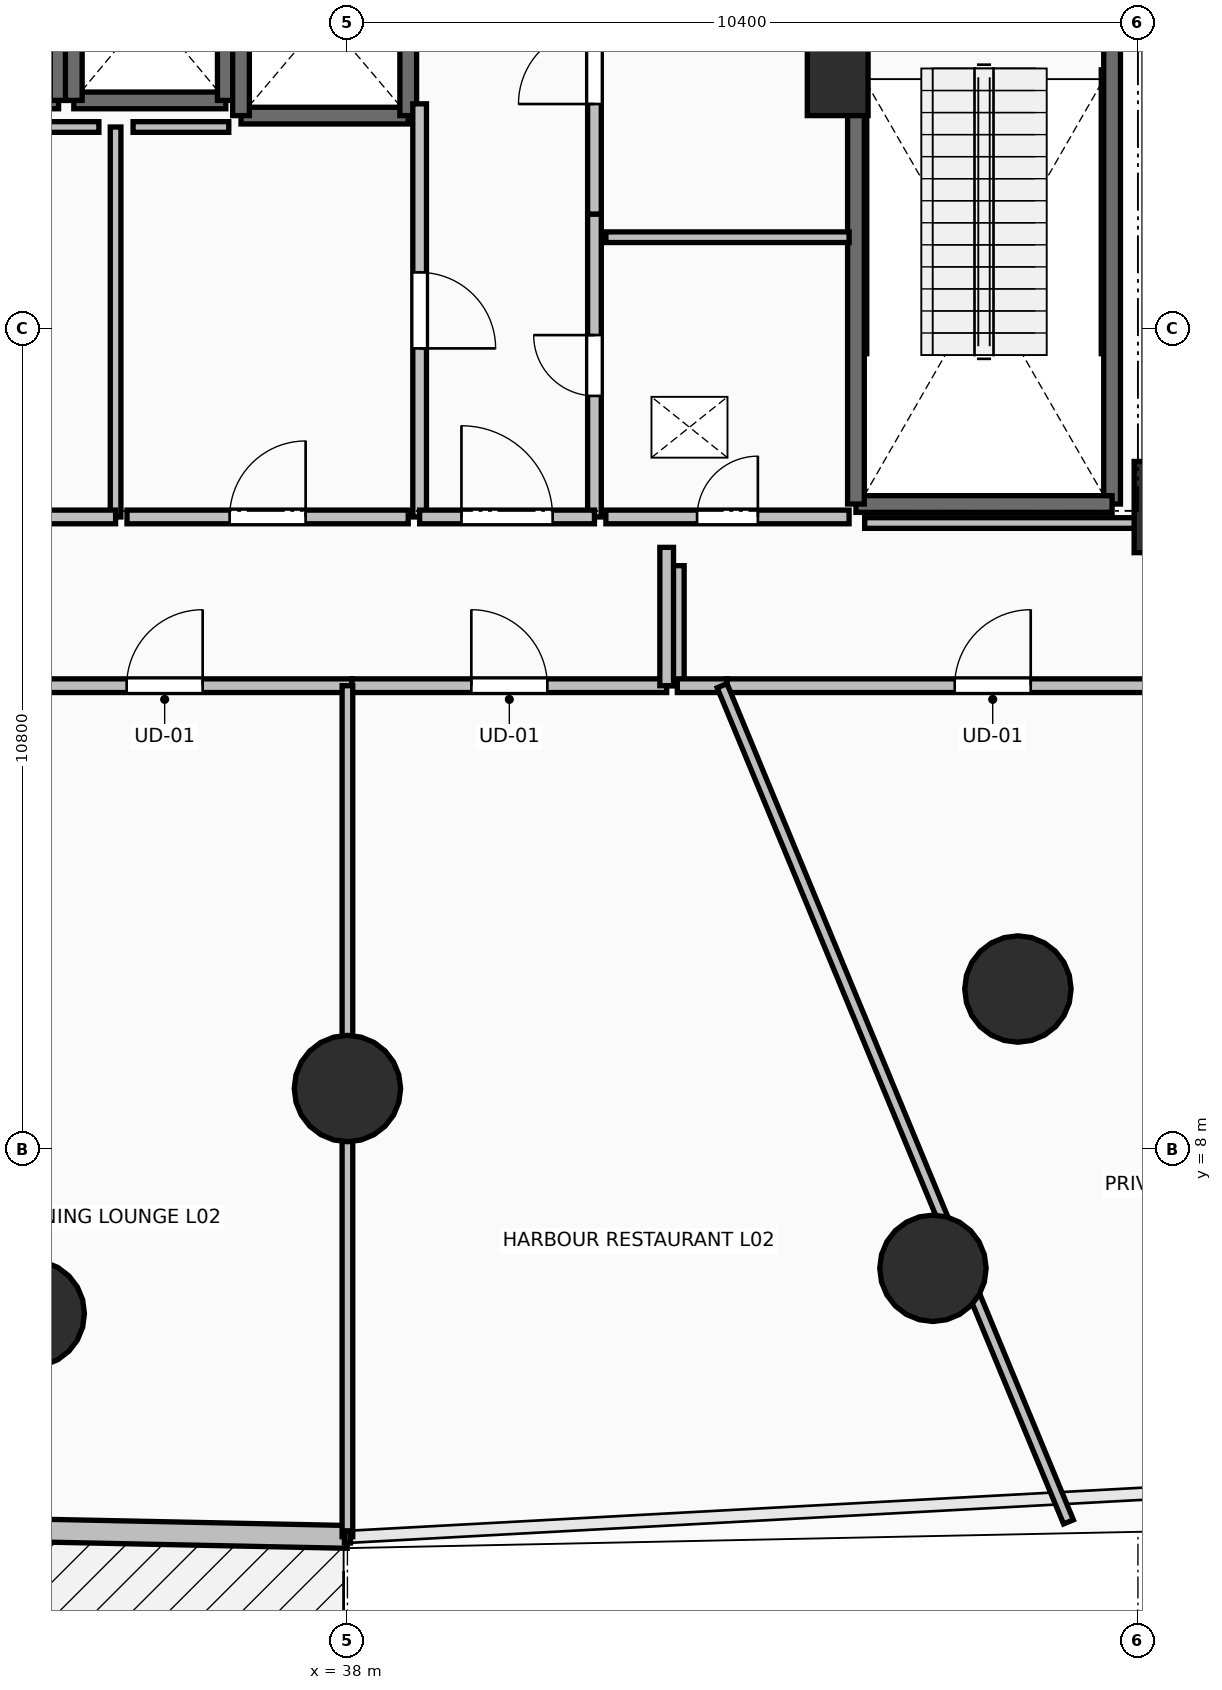
"""IFC4 building model, lengths in metres.
Left out: names, types, materials, properties, quantities, classifications, styles, units other than length and angle.
Written with IfcOpenShell. Run it as: python <this file> out.ifc"""

import sys

from ifc_helpers import new_model, si_unit, direction, frame, frame_2d, origin, origin_2d, place, context, subcontext, project, spatial, rectangle, circle, extrude, element, fill, save


model = new_model("IFC4")
c1 = context("Model", 3, precision=1e-05, world=origin(), true_north=direction((0.0, 1.0)))
c2 = subcontext(c1, "Body", "Model", "MODEL_VIEW")
j1 = project(units=[si_unit("LENGTHUNIT", "METRE"), si_unit("PLANEANGLEUNIT", "RADIAN")], contexts=[c1])
p1 = place(None, origin())
s1 = spatial("IfcSite", under=j1, at=p1, CompositionType="ELEMENT")
p2 = place(p1, origin())
s2 = spatial("IfcBuilding", under=s1, at=p2, CompositionType="ELEMENT")
p3 = place(p2, frame((0.0, 0.0, 9.6)))
s3 = spatial("IfcBuildingStorey", under=s2, at=p3, CompositionType="ELEMENT", Elevation=9.6)
for number, where, z_axis, x_axis in (
    (1, (38.0, 8.8, 0.0), (0.0, 0.0, 1.0), (0.0, -1.0, 0.0)),
    (2, (46.821, 10.109, 0.0), (0.0, 0.0, 1.0), (0.383, -0.924, 0.0)),
    (3, (33.84, 5.84, 0.0), (0.0, 0.0, 1.0), (0.0, -1.0, 0.0)),
    (4, (45.703, 6.435, 0.0), (0.0, 0.0, 1.0), (0.383, -0.924, 0.0)),
):
    element("IfcColumn", number, at=place(p3, frame(where, z_axis=z_axis, x_axis=x_axis)), inside=s3, PredefinedType="COLUMN", context=c2, shape_type="SweptSolid", body=[
        extrude(circle(Radius=0.7, at=origin_2d()), origin(), (0.0, 0.0, 1.0), 4.8),
    ])
for number, where, z_axis, x_axis in (
    (5, (48.75, 16.45, 0.0), (0.0, 0.0, 1.0), (1.0, 0.0, 0.0)),
    (6, (44.45, 22.2, 0.0), (0.0, 0.0, 1.0), (1.0, 0.0, 0.0)),
):
    element("IfcColumn", number, at=place(p3, frame(where, z_axis=z_axis, x_axis=x_axis)), inside=s3, PredefinedType="PILASTER", context=c2, shape_type="SweptSolid", body=[
        extrude(rectangle(XDim=0.8, YDim=1.2, at=origin_2d()), origin(), (0.0, 0.0, 1.0), 4.8),
    ])
p4 = place(p3, frame((25.732, 3.154, 0.0), z_axis=(0.0, 0.0, 1.0), x_axis=(0.99978877583, -0.020552462746, 0.0)))
e7 = element("IfcWall", 7, at=p4, inside=s3, PredefinedType="STANDARD", context=c2, shape_type="SweptSolid", body=[
    extrude(rectangle(XDim=12.271, YDim=0.3, at=frame_2d((6.135, 0.0))), origin(), (0.0, 0.0, 1.0), 4.48),
])
p5 = place(p4, frame((5.335, 0.0, 0.0)))
e8 = element("IfcOpeningElement", 8, at=p5, cuts=e7, PredefinedType="OPENING", context=c2, shape_type="SweptSolid", body=[
    extrude(rectangle(XDim=1.6, YDim=2.3, at=frame_2d((0.8, 1.15))), frame((0.0, 0.165, 0.0), z_axis=(0.0, -1.0, 0.0), x_axis=(1.0, 0.0, 0.0)), (0.0, 0.0, 1.0), 0.33),
])
p6 = place(p3, frame((48.06, 23.91, 0.0), z_axis=(0.0, 0.0, 1.0), x_axis=(0.0, -1.0, 0.0)))
e9 = element("IfcWall", 9, at=p6, inside=s3, PredefinedType="SOLIDWALL", context=c2, shape_type="SweptSolid", body=[
    extrude(rectangle(XDim=7.42, YDim=0.22, at=frame_2d((3.71, 0.0))), origin(), (0.0, 0.0, 1.0), 4.48),
])
p7 = place(p3, frame((48.06, 16.49, 0.0), z_axis=(0.0, 0.0, 1.0), x_axis=(-1.0, 0.0, 0.0)))
e10 = element("IfcWall", 10, at=p7, inside=s3, PredefinedType="SOLIDWALL", context=c2, shape_type="SweptSolid", body=[
    extrude(rectangle(XDim=3.37, YDim=0.22, at=frame_2d((1.685, 0.0))), origin(), (0.0, 0.0, 1.0), 4.48),
])
p8 = place(p3, frame((44.69, 16.49, 0.0), z_axis=(0.0, 0.0, 1.0), x_axis=(0.0, 1.0, 0.0)))
e11 = element("IfcWall", 11, at=p8, inside=s3, PredefinedType="SOLIDWALL", context=c2, shape_type="SweptSolid", body=[
    extrude(rectangle(XDim=7.42, YDim=0.22, at=frame_2d((3.71, 0.0))), origin(), (0.0, 0.0, 1.0), 4.48),
])
p9 = place(p3, frame((32.2, 21.8, 0.0), z_axis=(0.0, 0.0, 1.0), x_axis=(1.0, 0.0, 0.0)))
e12 = element("IfcWall", 12, at=p9, inside=s3, PredefinedType="SOLIDWALL", context=c2, shape_type="SweptSolid", body=[
    extrude(rectangle(XDim=2.0, YDim=0.22, at=frame_2d((1.0, 0.0))), origin(), (0.0, 0.0, 1.0), 4.48),
])
p10 = place(p3, frame((34.2, 21.8, 0.0), z_axis=(0.0, 0.0, 1.0), x_axis=(0.0, 1.0, 0.0)))
e13 = element("IfcWall", 13, at=p10, inside=s3, PredefinedType="SOLIDWALL", context=c2, shape_type="SweptSolid", body=[
    extrude(rectangle(XDim=2.4, YDim=0.22, at=frame_2d((1.2, 0.0))), origin(), (0.0, 0.0, 1.0), 4.48),
])
p11 = place(p3, frame((34.4, 21.8, 0.0), z_axis=(0.0, 0.0, 1.0), x_axis=(1.0, 0.0, 0.0)))
e14 = element("IfcWall", 14, at=p11, inside=s3, PredefinedType="SOLIDWALL", context=c2, shape_type="SweptSolid", body=[
    extrude(rectangle(XDim=2.0, YDim=0.22, at=frame_2d((1.0, 0.0))), origin(), (0.0, 0.0, 1.0), 4.48),
])
for number, where, z_axis, x_axis in (
    (15, (36.4, 21.8, 0.0), (0.0, 0.0, 1.0), (0.0, 1.0, 0.0)),
    (16, (34.4, 24.2, 0.0), (0.0, 0.0, 1.0), (0.0, -1.0, 0.0)),
):
    element("IfcWall", number, at=place(p3, frame(where, z_axis=z_axis, x_axis=x_axis)), inside=s3, PredefinedType="SOLIDWALL", context=c2, shape_type="SweptSolid", body=[
        extrude(rectangle(XDim=2.4, YDim=0.22, at=frame_2d((1.2, 0.0))), origin(), (0.0, 0.0, 1.0), 4.48),
    ])
p12 = place(p3, frame((36.6, 21.6, 0.0), z_axis=(0.0, 0.0, 1.0), x_axis=(1.0, 0.0, 0.0)))
e17 = element("IfcWall", 17, at=p12, inside=s3, PredefinedType="SOLIDWALL", context=c2, shape_type="SweptSolid", body=[
    extrude(rectangle(XDim=2.2, YDim=0.22, at=frame_2d((1.1, 0.0))), origin(), (0.0, 0.0, 1.0), 4.48),
])
for number, where, z_axis, x_axis in (
    (18, (38.8, 21.6, 0.0), (0.0, 0.0, 1.0), (0.0, 1.0, 0.0)),
    (19, (36.6, 24.2, 0.0), (0.0, 0.0, 1.0), (0.0, -1.0, 0.0)),
):
    element("IfcWall", number, at=place(p3, frame(where, z_axis=z_axis, x_axis=x_axis)), inside=s3, PredefinedType="SOLIDWALL", context=c2, shape_type="SweptSolid", body=[
        extrude(rectangle(XDim=2.6, YDim=0.22, at=frame_2d((1.3, 0.0))), origin(), (0.0, 0.0, 1.0), 4.48),
    ])
p13 = place(p3, frame((41.25, 16.32, 0.0), z_axis=(0.0, 0.0, 1.0), x_axis=(0.0, 1.0, 0.0)))
e20 = element("IfcWall", 20, at=p13, inside=s3, PredefinedType="PARTITIONING", context=c2, shape_type="SweptSolid", body=[
    extrude(rectangle(XDim=3.985, YDim=0.18, at=frame_2d((1.992, 0.0))), origin(), (0.0, 0.0, 1.0), 4.48),
])
p14 = place(p13, frame((1.593, 0.0, 0.0)))
e21 = element("IfcOpeningElement", 21, at=p14, cuts=e20, PredefinedType="OPENING", context=c2, shape_type="SweptSolid", body=[
    extrude(rectangle(XDim=0.8, YDim=2.05, at=frame_2d((0.4, 1.025))), frame((0.0, 0.105, 0.0), z_axis=(0.0, -1.0, 0.0), x_axis=(1.0, 0.0, 0.0)), (0.0, 0.0, 1.0), 0.21),
])
p15 = place(p3, frame((41.25, 20.305, 0.0), z_axis=(0.0, 0.0, 1.0), x_axis=(0.0, 1.0, 0.0)))
e22 = element("IfcWall", 22, at=p15, inside=s3, PredefinedType="PARTITIONING", context=c2, shape_type="SweptSolid", body=[
    extrude(rectangle(XDim=3.895, YDim=0.18, at=frame_2d((1.948, 0.0))), origin(), (0.0, 0.0, 1.0), 4.48),
])
p16 = place(p15, frame((1.448, 0.0, 0.0)))
e23 = element("IfcOpeningElement", 23, at=p16, cuts=e22, PredefinedType="OPENING", context=c2, shape_type="SweptSolid", body=[
    extrude(rectangle(XDim=1.0, YDim=2.15, at=frame_2d((0.5, 1.075))), frame((0.0, 0.105, 0.0), z_axis=(0.0, -1.0, 0.0), x_axis=(1.0, 0.0, 0.0)), (0.0, 0.0, 1.0), 0.21),
])
p17 = place(p3, frame((38.95, 21.755, 0.0), z_axis=(0.0, 0.0, 1.0), x_axis=(0.0, -1.0, 0.0)))
e24 = element("IfcWall", 24, at=p17, inside=s3, PredefinedType="PARTITIONING", context=c2, shape_type="SweptSolid", body=[
    extrude(rectangle(XDim=5.435, YDim=0.18, at=frame_2d((2.717, 0.0))), origin(), (0.0, 0.0, 1.0), 4.48),
])
p18 = place(p17, frame((2.218, 0.0, 0.0)))
e25 = element("IfcOpeningElement", 25, at=p18, cuts=e24, PredefinedType="OPENING", context=c2, shape_type="SweptSolid", body=[
    extrude(rectangle(XDim=1.0, YDim=2.15, at=frame_2d((0.5, 1.075))), frame((0.0, 0.105, 0.0), z_axis=(0.0, -1.0, 0.0), x_axis=(1.0, 0.0, 0.0)), (0.0, 0.0, 1.0), 0.21),
])
p19 = place(p3, frame((38.95, 16.32, 0.0), z_axis=(0.0, 0.0, 1.0), x_axis=(1.0, 0.0, 0.0)))
e26 = element("IfcWall", 26, at=p19, inside=s3, PredefinedType="PARTITIONING", context=c2, shape_type="SweptSolid", body=[
    extrude(rectangle(XDim=2.3, YDim=0.18, at=frame_2d((1.15, 0.0))), origin(), (0.0, 0.0, 1.0), 4.48),
])
p20 = place(p19, frame((0.55, 0.0, 0.0)))
e27 = element("IfcOpeningElement", 27, at=p20, cuts=e26, PredefinedType="OPENING", context=c2, shape_type="SweptSolid", body=[
    extrude(rectangle(XDim=1.2, YDim=2.15, at=frame_2d((0.6, 1.075))), frame((0.0, 0.105, 0.0), z_axis=(0.0, -1.0, 0.0), x_axis=(1.0, 0.0, 0.0)), (0.0, 0.0, 1.0), 0.21),
])
p21 = place(p3, frame((44.6, 20.0, 0.0), z_axis=(0.0, 0.0, 1.0), x_axis=(-1.0, 0.0, 0.0)))
e28 = element("IfcWall", 28, at=p21, inside=s3, PredefinedType="PARTITIONING", context=c2, shape_type="SweptSolid", body=[
    extrude(rectangle(XDim=3.2, YDim=0.14, at=frame_2d((1.6, 0.0))), origin(), (0.0, 0.0, 1.0), 4.48),
])
p22 = place(p3, frame((41.4, 16.32, 0.0), z_axis=(0.0, 0.0, 1.0), x_axis=(1.0, 0.0, 0.0)))
e29 = element("IfcWall", 29, at=p22, inside=s3, PredefinedType="PARTITIONING", context=c2, shape_type="SweptSolid", body=[
    extrude(rectangle(XDim=3.2, YDim=0.18, at=frame_2d((1.6, 0.0))), origin(), (0.0, 0.0, 1.0), 4.48),
])
p23 = place(p22, frame((1.2, 0.0, 0.0)))
e30 = element("IfcOpeningElement", 30, at=p23, cuts=e29, PredefinedType="OPENING", context=c2, shape_type="SweptSolid", body=[
    extrude(rectangle(XDim=0.8, YDim=2.05, at=frame_2d((0.4, 1.025))), frame((0.0, 0.105, 0.0), z_axis=(0.0, -1.0, 0.0), x_axis=(1.0, 0.0, 0.0)), (0.0, 0.0, 1.0), 0.21),
])
p24 = place(p3, frame((34.95, 16.32, 0.0), z_axis=(0.0, 0.0, 1.0), x_axis=(0.0, 1.0, 0.0)))
e31 = element("IfcWall", 31, at=p24, inside=s3, PredefinedType="PARTITIONING", context=c2, shape_type="SweptSolid", body=[
    extrude(rectangle(XDim=5.13, YDim=0.14, at=frame_2d((2.565, 0.0))), origin(), (0.0, 0.0, 1.0), 4.48),
])
p25 = place(p3, frame((31.4, 16.32, 0.0), z_axis=(0.0, 0.0, 1.0), x_axis=(1.0, 0.0, 0.0)))
e32 = element("IfcWall", 32, at=p25, inside=s3, PredefinedType="PARTITIONING", context=c2, shape_type="SweptSolid", body=[
    extrude(rectangle(XDim=3.55, YDim=0.18, at=frame_2d((1.775, 0.0))), origin(), (0.0, 0.0, 1.0), 4.48),
])
p26 = place(p25, frame((1.35, 0.0, 0.0)))
e33 = element("IfcOpeningElement", 33, at=p26, cuts=e32, PredefinedType="OPENING", context=c2, shape_type="SweptSolid", body=[
    extrude(rectangle(XDim=0.85, YDim=2.1, at=frame_2d((0.425, 1.05))), frame((0.0, 0.105, 0.0), z_axis=(0.0, -1.0, 0.0), x_axis=(1.0, 0.0, 0.0)), (0.0, 0.0, 1.0), 0.21),
])
p27 = place(p3, frame((35.1, 16.32, 0.0), z_axis=(0.0, 0.0, 1.0), x_axis=(1.0, 0.0, 0.0)))
e34 = element("IfcWall", 34, at=p27, inside=s3, PredefinedType="PARTITIONING", context=c2, shape_type="SweptSolid", body=[
    extrude(rectangle(XDim=3.7, YDim=0.18, at=frame_2d((1.85, 0.0))), origin(), (0.0, 0.0, 1.0), 4.48),
])
p28 = place(p27, frame((1.35, 0.0, 0.0)))
e35 = element("IfcOpeningElement", 35, at=p28, cuts=e34, PredefinedType="OPENING", context=c2, shape_type="SweptSolid", body=[
    extrude(rectangle(XDim=1.0, YDim=2.15, at=frame_2d((0.5, 1.075))), frame((0.0, 0.105, 0.0), z_axis=(0.0, -1.0, 0.0), x_axis=(1.0, 0.0, 0.0)), (0.0, 0.0, 1.0), 0.21),
])
p29 = place(p3, frame((33.131, 14.1, 0.0), z_axis=(0.0, 0.0, 1.0), x_axis=(1.0, 0.0, 0.0)))
e36 = element("IfcWall", 36, at=p29, inside=s3, PredefinedType="PARTITIONING", context=c2, shape_type="SweptSolid", body=[
    extrude(rectangle(XDim=4.929, YDim=0.18, at=frame_2d((2.464, 0.0))), origin(), (0.0, 0.0, 1.0), 4.48),
])
p30 = place(p29, frame((1.965, 0.0, 0.0)))
e37 = element("IfcOpeningElement", 37, at=p30, cuts=e36, PredefinedType="OPENING", context=c2, shape_type="SweptSolid", body=[
    extrude(rectangle(XDim=1.0, YDim=2.15, at=frame_2d((0.5, 1.075))), frame((0.0, 0.105, 0.0), z_axis=(0.0, -1.0, 0.0), x_axis=(1.0, 0.0, 0.0)), (0.0, 0.0, 1.0), 0.21),
])
p31 = place(p3, frame((42.34, 15.679, 0.0), z_axis=(0.0, 0.0, 1.0), x_axis=(0.0, -1.0, 0.0)))
e38 = element("IfcWall", 38, at=p31, inside=s3, PredefinedType="PARTITIONING", context=c2, shape_type="SweptSolid", body=[
    extrude(rectangle(XDim=1.579, YDim=0.18, at=frame_2d((0.79, 0.0))), origin(), (0.0, 0.0, 1.0), 4.48),
])
p32 = place(p3, frame((42.34, 14.1, 0.0), z_axis=(0.0, 0.0, 1.0), x_axis=(1.0, 0.0, 0.0)))
e39 = element("IfcWall", 39, at=p32, inside=s3, PredefinedType="PARTITIONING", context=c2, shape_type="SweptSolid", body=[
    extrude(rectangle(XDim=0.654, YDim=0.18, at=frame_2d((0.327, 0.0))), origin(), (0.0, 0.0, 1.0), 4.48),
])
p33 = place(p3, frame((38.06, 14.1, 0.0), z_axis=(0.0, 0.0, 1.0), x_axis=(1.0, 0.0, 0.0)))
e40 = element("IfcWall", 40, at=p33, inside=s3, PredefinedType="PARTITIONING", context=c2, shape_type="SweptSolid", body=[
    extrude(rectangle(XDim=4.14, YDim=0.18, at=frame_2d((2.07, 0.0))), origin(), (0.0, 0.0, 1.0), 4.48),
])
p34 = place(p33, frame((1.57, 0.0, 0.0)))
e41 = element("IfcOpeningElement", 41, at=p34, cuts=e40, PredefinedType="OPENING", context=c2, shape_type="SweptSolid", body=[
    extrude(rectangle(XDim=1.0, YDim=2.15, at=frame_2d((0.5, 1.075))), frame((0.0, 0.105, 0.0), z_axis=(0.0, -1.0, 0.0), x_axis=(1.0, 0.0, 0.0)), (0.0, 0.0, 1.0), 0.21),
])
p35 = place(p3, frame((42.2, 14.1, 0.0), z_axis=(0.0, 0.0, 1.0), x_axis=(0.0, 1.0, 0.0)))
e42 = element("IfcWall", 42, at=p35, inside=s3, PredefinedType="PARTITIONING", context=c2, shape_type="SweptSolid", body=[
    extrude(rectangle(XDim=1.82, YDim=0.18, at=frame_2d((0.91, 0.0))), origin(), (0.0, 0.0, 1.0), 4.48),
])
p36 = place(p3, frame((42.994, 14.1, 0.0), z_axis=(0.0, 0.0, 1.0), x_axis=(1.0, 0.0, 0.0)))
e43 = element("IfcWall", 43, at=p36, inside=s3, PredefinedType="PARTITIONING", context=c2, shape_type="SweptSolid", body=[
    extrude(rectangle(XDim=6.991, YDim=0.18, at=frame_2d((3.496, 0.0))), origin(), (0.0, 0.0, 1.0), 3.672),
])
p37 = place(p36, frame((2.996, 0.0, 0.0)))
e44 = element("IfcOpeningElement", 44, at=p37, cuts=e43, PredefinedType="OPENING", context=c2, shape_type="SweptSolid", body=[
    extrude(rectangle(XDim=1.0, YDim=2.15, at=frame_2d((0.5, 1.075))), frame((0.0, 0.105, 0.0), z_axis=(0.0, -1.0, 0.0), x_axis=(1.0, 0.0, 0.0)), (0.0, 0.0, 1.0), 0.21),
])
p38 = place(p3, frame((38.0, 2.904, 0.0), z_axis=(0.0, 0.0, 1.0), x_axis=(0.0, 1.0, 0.0)))
e45 = element("IfcWall", 45, at=p38, inside=s3, PredefinedType="PARTITIONING", context=c2, shape_type="SweptSolid", body=[
    extrude(rectangle(XDim=11.196, YDim=0.14, at=frame_2d((5.598, 0.0))), origin(), (0.0, 0.0, 1.0), 3.672),
])
p39 = place(p3, frame((47.486, 3.099, 0.0), z_axis=(0.0, 0.0, 1.0), x_axis=(-0.38271032831, 0.923868391388, 0.0)))
e46 = element("IfcWall", 46, at=p39, inside=s3, PredefinedType="PARTITIONING", context=c2, shape_type="SweptSolid", body=[
    extrude(rectangle(XDim=11.907, YDim=0.14, at=frame_2d((5.954, 0.0))), origin(), (0.0, 0.0, 1.0), 3.672),
])
p40 = place(p3, frame((34.73, 21.45, 0.0), z_axis=(0.0, 0.0, 1.0), x_axis=(-1.0, 0.0, 0.0)))
e47 = element("IfcWall", 47, at=p40, inside=s3, PredefinedType="PARTITIONING", context=c2, shape_type="SweptSolid", body=[
    extrude(rectangle(XDim=3.2, YDim=0.14, at=frame_2d((1.6, 0.0))), origin(), (0.0, 0.0, 1.0), 4.48),
])
p41 = place(p3, frame((36.439, 21.45, 0.0), z_axis=(0.0, 0.0, 1.0), x_axis=(-1.0, 0.0, 0.0)))
e48 = element("IfcWall", 48, at=p41, inside=s3, PredefinedType="PARTITIONING", context=c2, shape_type="SweptSolid", body=[
    extrude(rectangle(XDim=1.259, YDim=0.14, at=frame_2d((0.629, 0.0))), origin(), (0.0, 0.0, 1.0), 4.48),
])
p42 = place(p3, frame((48.55, 16.24, 0.0), z_axis=(0.0, 0.0, 1.0), x_axis=(-1.0, 0.0, 0.0)))
e49 = element("IfcWall", 49, at=p42, inside=s3, PredefinedType="PARTITIONING", context=c2, shape_type="SweptSolid", body=[
    extrude(rectangle(XDim=3.745, YDim=0.14, at=frame_2d((1.873, 0.0))), origin(), (0.0, 0.0, 1.0), 3.672),
])
p43 = place(p14, origin())
e50 = element("IfcDoor", 50, at=p43, inside=s3, OperationType="SINGLE_SWING_RIGHT", PredefinedType="DOOR", context=c2, shape_type="SweptSolid", body=[
    extrude(rectangle(XDim=0.8, YDim=2.05, at=frame_2d((0.4, 1.025))), frame((0.0, 0.025, 0.0), z_axis=(0.0, -1.0, 0.0), x_axis=(1.0, 0.0, 0.0)), (0.0, 0.0, 1.0), 0.05),
])
fill(e21, e50)
p44 = place(p16, origin())
e51 = element("IfcDoor", 51, at=p44, inside=s3, OperationType="SINGLE_SWING_LEFT", PredefinedType="DOOR", context=c2, shape_type="SweptSolid", body=[
    extrude(rectangle(XDim=1.0, YDim=2.15, at=frame_2d((0.5, 1.075))), frame((0.0, 0.025, 0.0), z_axis=(0.0, -1.0, 0.0), x_axis=(1.0, 0.0, 0.0)), (0.0, 0.0, 1.0), 0.05),
])
fill(e23, e51)
p45 = place(p18, origin())
e52 = element("IfcDoor", 52, at=p45, inside=s3, OperationType="SINGLE_SWING_RIGHT", PredefinedType="DOOR", context=c2, shape_type="SweptSolid", body=[
    extrude(rectangle(XDim=1.0, YDim=2.15, at=frame_2d((0.5, 1.075))), frame((0.0, 0.025, 0.0), z_axis=(0.0, -1.0, 0.0), x_axis=(1.0, 0.0, 0.0)), (0.0, 0.0, 1.0), 0.05),
])
fill(e25, e52)
p46 = place(p20, origin())
e53 = element("IfcDoor", 53, at=p46, inside=s3, OperationType="SINGLE_SWING_LEFT", PredefinedType="DOOR", context=c2, shape_type="SweptSolid", body=[
    extrude(rectangle(XDim=1.2, YDim=2.15, at=frame_2d((0.6, 1.075))), frame((0.0, 0.025, 0.0), z_axis=(0.0, -1.0, 0.0), x_axis=(1.0, 0.0, 0.0)), (0.0, 0.0, 1.0), 0.05),
])
fill(e27, e53)
p47 = place(p23, origin())
e54 = element("IfcDoor", 54, at=p47, inside=s3, OperationType="SINGLE_SWING_RIGHT", PredefinedType="DOOR", context=c2, shape_type="SweptSolid", body=[
    extrude(rectangle(XDim=0.8, YDim=2.05, at=frame_2d((0.4, 1.025))), frame((0.0, 0.025, 0.0), z_axis=(0.0, -1.0, 0.0), x_axis=(1.0, 0.0, 0.0)), (0.0, 0.0, 1.0), 0.05),
])
fill(e30, e54)
p48 = place(p28, origin())
e55 = element("IfcDoor", 55, at=p48, inside=s3, OperationType="SINGLE_SWING_RIGHT", PredefinedType="DOOR", context=c2, shape_type="SweptSolid", body=[
    extrude(rectangle(XDim=1.0, YDim=2.15, at=frame_2d((0.5, 1.075))), frame((0.0, 0.025, 0.0), z_axis=(0.0, -1.0, 0.0), x_axis=(1.0, 0.0, 0.0)), (0.0, 0.0, 1.0), 0.05),
])
fill(e35, e55)
p49 = place(p30, origin())
e56 = element("IfcDoor", 56, at=p49, inside=s3, OperationType="SINGLE_SWING_RIGHT", PredefinedType="DOOR", context=c2, shape_type="SweptSolid", body=[
    extrude(rectangle(XDim=1.0, YDim=2.15, at=frame_2d((0.5, 1.075))), frame((0.0, 0.025, 0.0), z_axis=(0.0, -1.0, 0.0), x_axis=(1.0, 0.0, 0.0)), (0.0, 0.0, 1.0), 0.05),
])
fill(e37, e56)
p50 = place(p34, origin())
e57 = element("IfcDoor", 57, at=p50, inside=s3, OperationType="SINGLE_SWING_LEFT", PredefinedType="DOOR", context=c2, shape_type="SweptSolid", body=[
    extrude(rectangle(XDim=1.0, YDim=2.15, at=frame_2d((0.5, 1.075))), frame((0.0, 0.025, 0.0), z_axis=(0.0, -1.0, 0.0), x_axis=(1.0, 0.0, 0.0)), (0.0, 0.0, 1.0), 0.05),
])
fill(e41, e57)
p51 = place(p37, origin())
e58 = element("IfcDoor", 58, at=p51, inside=s3, OperationType="SINGLE_SWING_RIGHT", PredefinedType="DOOR", context=c2, shape_type="SweptSolid", body=[
    extrude(rectangle(XDim=1.0, YDim=2.15, at=frame_2d((0.5, 1.075))), frame((0.0, 0.025, 0.0), z_axis=(0.0, -1.0, 0.0), x_axis=(1.0, 0.0, 0.0)), (0.0, 0.0, 1.0), 0.05),
])
fill(e44, e58)
save(model, sys.argv[1])
